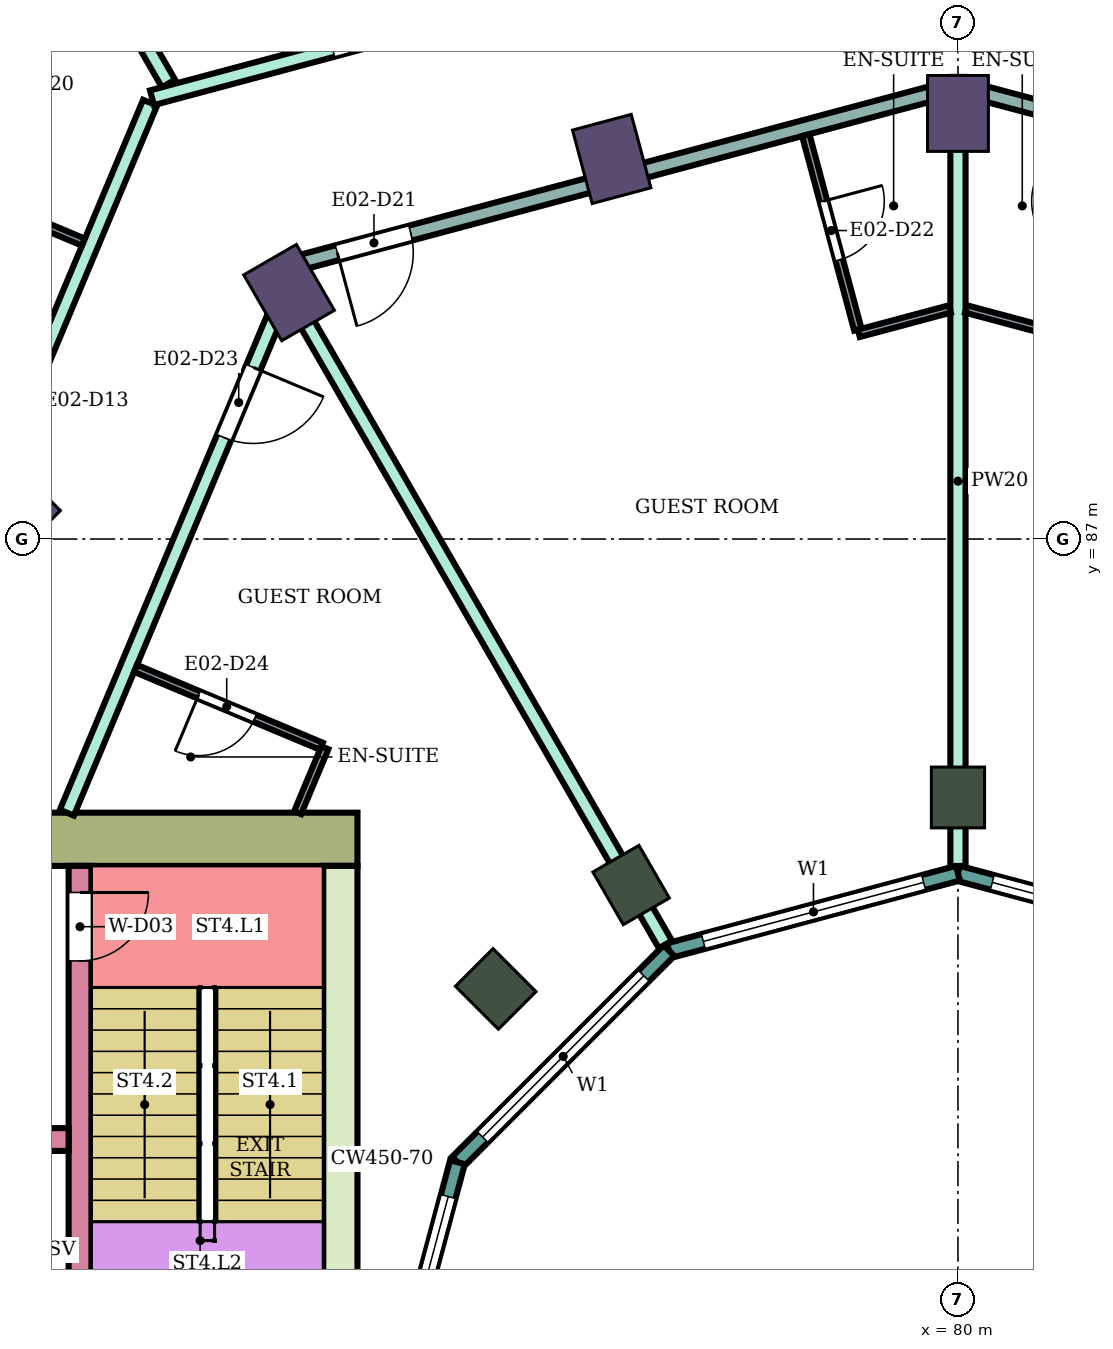
"""IFC4 building model, lengths in metres.
Left out: names, types, materials, properties, quantities, classifications, styles, units other than length and angle.
Written with IfcOpenShell. Run it as: python <this file> out.ifc"""

import sys

from ifc_helpers import new_model, si_unit, direction, frame, frame_2d, origin, origin_2d, place, context, subcontext, project, spatial, rectangle, extrude, element, fill, save


model = new_model("IFC4")
c1 = context("Model", 3, precision=1e-05, world=origin(), true_north=direction((0.0, 1.0)))
c2 = subcontext(c1, "Body", "Model", "MODEL_VIEW")
j1 = project(units=[si_unit("LENGTHUNIT", "METRE"), si_unit("PLANEANGLEUNIT", "RADIAN")], contexts=[c1])
p1 = place(None, origin())
s1 = spatial("IfcSite", under=j1, at=p1, CompositionType="ELEMENT")
p2 = place(p1, origin())
s2 = spatial("IfcBuilding", under=s1, at=p2, CompositionType="ELEMENT")
p3 = place(p2, frame((0.0, 0.0, 134.1)))
s3 = spatial("IfcBuildingStorey", under=s2, at=p3, CompositionType="ELEMENT", Elevation=134.1)
for number, where, z_axis, x_axis in (
    (1, (80.0, 92.6, 0.0), (0.0, 0.0, 1.0), (0.0, 1.0, 0.0)),
    (2, (75.445, 92.0, 0.0), (0.0, 0.0, 1.0), (-0.259, 0.966, 0.0)),
    (3, (71.2, 90.242, 0.0), (0.0, 0.0, 1.0), (-0.5, 0.866, 0.0)),
    (4, (67.555, 87.445, 0.0), (0.0, 0.0, 1.0), (-0.707, 0.707, 0.0)),
):
    element("IfcColumn", number, at=place(p3, frame(where, z_axis=z_axis, x_axis=x_axis)), inside=s3, PredefinedType="COLUMN", context=c2, shape_type="SweptSolid", body=[
        extrude(rectangle(XDim=1.0, YDim=0.8, at=origin_2d()), origin(), (0.0, 0.0, 1.0), 3.9),
    ])
for number, where, z_axis, x_axis in (
    (5, (80.0, 83.6, 0.0), (0.0, 0.0, 1.0), (0.0, 1.0, 0.0)),
    (6, (75.7, 82.448, 0.0), (0.0, 0.0, 1.0), (-0.5, 0.866, 0.0)),
    (7, (73.919, 81.081, 0.0), (0.0, 0.0, 1.0), (-0.707, 0.707, 0.0)),
):
    element("IfcColumn", number, at=place(p3, frame(where, z_axis=z_axis, x_axis=x_axis)), inside=s3, PredefinedType="COLUMN", context=c2, shape_type="SweptSolid", body=[
        extrude(rectangle(XDim=0.8, YDim=0.7, at=origin_2d()), origin(), (0.0, 0.0, 1.0), 3.9),
    ])
p4 = place(p3, frame((72.1, 83.05, 0.0), z_axis=(0.0, 0.0, 1.0), x_axis=(-1.0, 0.0, 0.0)))
e8 = element("IfcWall", 8, at=p4, inside=s3, PredefinedType="SHEAR", context=c2, shape_type="SweptSolid", body=[
    extrude(rectangle(XDim=14.8, YDim=0.7, at=frame_2d((7.4, 0.0))), origin(), (0.0, 0.0, 1.0), 3.58),
])
p5 = place(p4, frame((4.2, 0.0, 0.0)))
e9 = element("IfcOpeningElement", 9, at=p5, cuts=e8, PredefinedType="OPENING", context=c2, shape_type="SweptSolid", body=[
    extrude(rectangle(XDim=2.4, YDim=2.4, at=frame_2d((1.2, 1.2))), frame((0.0, 0.36, 0.0), z_axis=(0.0, -1.0, 0.0), x_axis=(1.0, 0.0, 0.0)), (0.0, 0.0, 1.0), 0.72),
])
p6 = place(p3, frame((71.875, 82.7, 0.0), z_axis=(0.0, 0.0, 1.0), x_axis=(0.0, -1.0, 0.0)))
e10 = element("IfcWall", 10, at=p6, inside=s3, PredefinedType="SHEAR", context=c2, shape_type="SweptSolid", body=[
    extrude(rectangle(XDim=7.7, YDim=0.45, at=frame_2d((3.85, 0.0))), origin(), (0.0, 0.0, 1.0), 3.58),
])
p7 = place(p3, frame((68.45, 82.7, 0.0), z_axis=(0.0, 0.0, 1.0), x_axis=(0.0, -1.0, 0.0)))
e11 = element("IfcWall", 11, at=p7, inside=s3, PredefinedType="SHEAR", context=c2, shape_type="SweptSolid", body=[
    extrude(rectangle(XDim=7.7, YDim=0.3, at=frame_2d((3.85, 0.0))), origin(), (0.0, 0.0, 1.0), 3.58),
])
p8 = place(p7, frame((0.35, 0.0, 0.0)))
e12 = element("IfcOpeningElement", 12, at=p8, cuts=e11, PredefinedType="OPENING", context=c2, shape_type="SweptSolid", body=[
    extrude(rectangle(XDim=0.9, YDim=2.1, at=frame_2d((0.45, 1.05))), frame((0.0, 0.16, 0.0), z_axis=(0.0, -1.0, 0.0), x_axis=(1.0, 0.0, 0.0)), (0.0, 0.0, 1.0), 0.32),
])
p9 = place(p3, frame((68.3, 79.1, 0.0), z_axis=(0.0, 0.0, 1.0), x_axis=(-1.0, 0.0, 0.0)))
e13 = element("IfcWall", 13, at=p9, inside=s3, PredefinedType="SHEAR", context=c2, shape_type="SweptSolid", body=[
    extrude(rectangle(XDim=11.0, YDim=0.3, at=frame_2d((5.5, 0.0))), origin(), (0.0, 0.0, 1.0), 3.58),
])
p10 = place(p9, frame((0.4, 0.0, 0.0)))
e14 = element("IfcOpeningElement", 14, at=p10, cuts=e13, PredefinedType="OPENING", context=c2, shape_type="SweptSolid", body=[
    extrude(rectangle(XDim=1.4, YDim=2.1, at=frame_2d((0.7, 1.05))), frame((0.0, 0.16, 0.0), z_axis=(0.0, -1.0, 0.0), x_axis=(1.0, 0.0, 0.0)), (0.0, 0.0, 1.0), 0.32),
])
p11 = place(p9, frame((5.4, 0.0, 0.0)))
e15 = element("IfcOpeningElement", 15, at=p11, cuts=e13, PredefinedType="OPENING", context=c2, shape_type="SweptSolid", body=[
    extrude(rectangle(XDim=1.4, YDim=2.1, at=frame_2d((0.7, 1.05))), frame((0.0, 0.16, 0.0), z_axis=(0.0, -1.0, 0.0), x_axis=(1.0, 0.0, 0.0)), (0.0, 0.0, 1.0), 0.32),
])
p12 = place(p9, frame((8.1, 0.0, 0.0)))
e16 = element("IfcOpeningElement", 16, at=p12, cuts=e13, PredefinedType="OPENING", context=c2, shape_type="SweptSolid", body=[
    extrude(rectangle(XDim=1.0, YDim=2.1, at=frame_2d((0.5, 1.05))), frame((0.0, 0.16, 0.0), z_axis=(0.0, -1.0, 0.0), x_axis=(1.0, 0.0, 0.0)), (0.0, 0.0, 1.0), 0.32),
])
p13 = place(p3, frame((83.802, 81.585, 0.0), z_axis=(0.0, 0.0, 1.0), x_axis=(-0.965933654434, 0.258789828301, 0.0)))
e17 = element("IfcWall", 17, at=p13, inside=s3, PredefinedType="NOTDEFINED", context=c2, shape_type="SweptSolid", body=[
    extrude(rectangle(XDim=3.936, YDim=0.2, at=frame_2d((1.968, 0.0))), origin(), (0.0, 0.0, 1.0), 3.9),
])
p14 = place(p13, frame((0.468, 0.0, 0.9)))
e18 = element("IfcOpeningElement", 18, at=p14, cuts=e17, PredefinedType="OPENING", context=c2, shape_type="SweptSolid", body=[
    extrude(rectangle(XDim=3.0, YDim=2.3, at=frame_2d((1.5, 1.15))), frame((0.0, 0.11, 0.0), z_axis=(0.0, -1.0, 0.0), x_axis=(1.0, 0.0, 0.0)), (0.0, 0.0, 1.0), 0.22),
])
p15 = place(p3, frame((80.0, 82.604, 0.0), z_axis=(0.0, 0.0, 1.0), x_axis=(-0.965933654434, -0.258789828301, 0.0)))
e19 = element("IfcWall", 19, at=p15, inside=s3, PredefinedType="NOTDEFINED", context=c2, shape_type="SweptSolid", body=[
    extrude(rectangle(XDim=3.936, YDim=0.2, at=frame_2d((1.968, 0.0))), origin(), (0.0, 0.0, 1.0), 3.9),
])
p16 = place(p15, frame((0.468, 0.0, 0.9)))
e20 = element("IfcOpeningElement", 20, at=p16, cuts=e19, PredefinedType="OPENING", context=c2, shape_type="SweptSolid", body=[
    extrude(rectangle(XDim=3.0, YDim=2.3, at=frame_2d((1.5, 1.15))), frame((0.0, 0.11, 0.0), z_axis=(0.0, -1.0, 0.0), x_axis=(1.0, 0.0, 0.0)), (0.0, 0.0, 1.0), 0.22),
])
p17 = place(p3, frame((76.198, 81.585, 0.0), z_axis=(0.0, 0.0, 1.0), x_axis=(-0.707106781187, -0.707106781187, 0.0)))
e21 = element("IfcWall", 21, at=p17, inside=s3, PredefinedType="NOTDEFINED", context=c2, shape_type="SweptSolid", body=[
    extrude(rectangle(XDim=3.936, YDim=0.2, at=frame_2d((1.968, 0.0))), origin(), (0.0, 0.0, 1.0), 3.9),
])
p18 = place(p17, frame((0.468, 0.0, 0.9)))
e22 = element("IfcOpeningElement", 22, at=p18, cuts=e21, PredefinedType="OPENING", context=c2, shape_type="SweptSolid", body=[
    extrude(rectangle(XDim=3.0, YDim=2.3, at=frame_2d((1.5, 1.15))), frame((0.0, 0.11, 0.0), z_axis=(0.0, -1.0, 0.0), x_axis=(1.0, 0.0, 0.0)), (0.0, 0.0, 1.0), 0.22),
])
p19 = place(p3, frame((73.415, 78.802, 0.0), z_axis=(0.0, 0.0, 1.0), x_axis=(-0.258789828301, -0.965933654434, 0.0)))
e23 = element("IfcWall", 23, at=p19, inside=s3, PredefinedType="NOTDEFINED", context=c2, shape_type="SweptSolid", body=[
    extrude(rectangle(XDim=3.936, YDim=0.2, at=frame_2d((1.968, 0.0))), origin(), (0.0, 0.0, 1.0), 3.9),
])
p20 = place(p19, frame((0.468, 0.0, 0.9)))
e24 = element("IfcOpeningElement", 24, at=p20, cuts=e23, PredefinedType="OPENING", context=c2, shape_type="SweptSolid", body=[
    extrude(rectangle(XDim=3.0, YDim=2.3, at=frame_2d((1.5, 1.15))), frame((0.0, 0.11, 0.0), z_axis=(0.0, -1.0, 0.0), x_axis=(1.0, 0.0, 0.0)), (0.0, 0.0, 1.0), 0.22),
])
p21 = place(p3, frame((66.085, 84.9, 0.0), z_axis=(0.0, 0.0, 1.0), x_axis=(0.386617151403, 0.922240303956, 0.0)))
e25 = element("IfcWall", 25, at=p21, inside=s3, PredefinedType="PARTITIONING", context=c2, shape_type="SweptSolid", body=[
    extrude(rectangle(XDim=8.5, YDim=0.2, at=frame_2d((4.25, 0.0))), origin(), (0.0, 0.0, 1.0), 3.45),
])
p22 = place(p21, frame((3.748, 0.0, 0.0)))
e26 = element("IfcOpeningElement", 26, at=p22, cuts=e25, PredefinedType="OPENING", context=c2, shape_type="SweptSolid", body=[
    extrude(rectangle(XDim=1.0, YDim=2.1, at=frame_2d((0.5, 1.05))), frame((0.0, 0.11, 0.0), z_axis=(0.0, -1.0, 0.0), x_axis=(1.0, 0.0, 0.0)), (0.0, 0.0, 1.0), 0.22),
])
p23 = place(p3, frame((67.104, 97.343, 0.0), z_axis=(0.0, 0.0, 1.0), x_axis=(0.499893606134, -0.866086821598, 0.0)))
e27 = element("IfcWall", 27, at=p23, inside=s3, PredefinedType="PARTITIONING", context=c2, shape_type="SweptSolid", body=[
    extrude(rectangle(XDim=5.021, YDim=0.2, at=frame_2d((2.511, 0.0))), origin(), (0.0, 0.0, 1.0), 3.45),
])
p24 = place(p3, frame((68.277, 83.4, 0.0), z_axis=(0.0, 0.0, 1.0), x_axis=(0.386454861164, 0.922308321703, 0.0)))
e28 = element("IfcWall", 28, at=p24, inside=s3, PredefinedType="PARTITIONING", context=c2, shape_type="SweptSolid", body=[
    extrude(rectangle(XDim=7.762, YDim=0.2, at=frame_2d((3.881, 0.0))), origin(), (0.0, 0.0, 1.0), 3.45),
])
p25 = place(p24, frame((5.351, 0.0, 0.0)))
e29 = element("IfcOpeningElement", 29, at=p25, cuts=e28, PredefinedType="OPENING", context=c2, shape_type="SweptSolid", body=[
    extrude(rectangle(XDim=1.0, YDim=2.1, at=frame_2d((0.5, 1.05))), frame((0.0, 0.11, 0.0), z_axis=(0.0, -1.0, 0.0), x_axis=(1.0, 0.0, 0.0)), (0.0, 0.0, 1.0), 0.22),
])
p26 = place(p3, frame((69.397, 92.805, 0.0), z_axis=(0.0, 0.0, 1.0), x_axis=(0.965971666602, 0.258647906087, 0.0)))
e30 = element("IfcWall", 30, at=p26, inside=s3, PredefinedType="PARTITIONING", context=c2, shape_type="SweptSolid", body=[
    extrude(rectangle(XDim=10.887, YDim=0.2, at=frame_2d((5.443, 0.0))), origin(), (0.0, 0.0, 1.0), 3.45),
])
p27 = place(p26, frame((6.163, 0.0, 0.0)))
e31 = element("IfcOpeningElement", 31, at=p27, cuts=e30, PredefinedType="OPENING", context=c2, shape_type="SweptSolid", body=[
    extrude(rectangle(XDim=1.0, YDim=2.1, at=frame_2d((0.5, 1.05))), frame((0.0, 0.11, 0.0), z_axis=(0.0, -1.0, 0.0), x_axis=(1.0, 0.0, 0.0)), (0.0, 0.0, 1.0), 0.22),
])
p28 = place(p26, frame((2.461, 0.0, 0.0)))
e32 = element("IfcOpeningElement", 32, at=p28, cuts=e30, PredefinedType="OPENING", context=c2, shape_type="SweptSolid", body=[
    extrude(rectangle(XDim=1.0, YDim=2.1, at=frame_2d((0.5, 1.05))), frame((0.0, 0.11, 0.0), z_axis=(0.0, -1.0, 0.0), x_axis=(1.0, 0.0, 0.0)), (0.0, 0.0, 1.0), 0.22),
])
p29 = place(p3, frame((71.263, 90.135, 0.0), z_axis=(0.0, 0.0, 1.0), x_axis=(0.499869438034, -0.86610077065, 0.0)))
e33 = element("IfcWall", 33, at=p29, inside=s3, PredefinedType="PARTITIONING", context=c2, shape_type="SweptSolid", body=[
    extrude(rectangle(XDim=9.777, YDim=0.2, at=frame_2d((4.889, 0.0))), origin(), (0.0, 0.0, 1.0), 3.45),
])
p30 = place(p3, frame((71.303, 90.625, 0.0), z_axis=(0.0, 0.0, 1.0), x_axis=(0.965971868307, 0.258647152776, 0.0)))
e34 = element("IfcWall", 34, at=p30, inside=s3, PredefinedType="PARTITIONING", context=c2, shape_type="SweptSolid", body=[
    extrude(rectangle(XDim=8.874, YDim=0.2, at=frame_2d((4.437, 0.0))), origin(), (0.0, 0.0, 1.0), 3.08),
])
p31 = place(p30, frame((0.55, 0.0, 0.0)))
e35 = element("IfcOpeningElement", 35, at=p31, cuts=e34, PredefinedType="OPENING", context=c2, shape_type="SweptSolid", body=[
    extrude(rectangle(XDim=1.0, YDim=2.1, at=frame_2d((0.5, 1.05))), frame((0.0, 0.11, 0.0), z_axis=(0.0, -1.0, 0.0), x_axis=(1.0, 0.0, 0.0)), (0.0, 0.0, 1.0), 0.22),
])
p32 = place(p3, frame((80.0, 82.699, 0.0), z_axis=(0.0, 0.0, 1.0), x_axis=(0.0, 1.0, 0.0)))
e36 = element("IfcWall", 36, at=p32, inside=s3, PredefinedType="PARTITIONING", context=c2, shape_type="SweptSolid", body=[
    extrude(rectangle(XDim=10.125, YDim=0.2, at=frame_2d((5.062, 0.0))), origin(), (0.0, 0.0, 1.0), 3.45),
])
p33 = place(p3, frame((80.0, 92.954, 0.0), z_axis=(0.0, 0.0, 1.0), x_axis=(0.96592536278, -0.258820774936, 0.0)))
e37 = element("IfcWall", 37, at=p33, inside=s3, PredefinedType="PARTITIONING", context=c2, shape_type="SweptSolid", body=[
    extrude(rectangle(XDim=8.934, YDim=0.2, at=frame_2d((4.467, 0.0))), origin(), (0.0, 0.0, 1.0), 3.08),
])
p34 = place(p33, frame((7.454, 0.0, 0.0)))
e38 = element("IfcOpeningElement", 38, at=p34, cuts=e37, PredefinedType="OPENING", context=c2, shape_type="SweptSolid", body=[
    extrude(rectangle(XDim=1.0, YDim=2.1, at=frame_2d((0.5, 1.05))), frame((0.0, 0.11, 0.0), z_axis=(0.0, -1.0, 0.0), x_axis=(1.0, 0.0, 0.0)), (0.0, 0.0, 1.0), 0.22),
])
p35 = place(p3, frame((80.0, 95.648, 0.0), z_axis=(0.0, 0.0, 1.0), x_axis=(0.965852259202, -0.259093445292, 0.0)))
e39 = element("IfcWall", 39, at=p35, inside=s3, PredefinedType="PARTITIONING", context=c2, shape_type="SweptSolid", body=[
    extrude(rectangle(XDim=10.597, YDim=0.2, at=frame_2d((5.298, 0.0))), origin(), (0.0, 0.0, 1.0), 3.45),
])
p36 = place(p35, frame((1.0, 0.0, 0.0)))
e40 = element("IfcOpeningElement", 40, at=p36, cuts=e39, PredefinedType="OPENING", context=c2, shape_type="SweptSolid", body=[
    extrude(rectangle(XDim=1.0, YDim=2.1, at=frame_2d((0.5, 1.05))), frame((0.0, 0.11, 0.0), z_axis=(0.0, -1.0, 0.0), x_axis=(1.0, 0.0, 0.0)), (0.0, 0.0, 1.0), 0.22),
])
p37 = place(p3, frame((66.049, 91.931, 0.0), z_axis=(0.0, 0.0, 1.0), x_axis=(0.922344808264, -0.38636777126, 0.0)))
e41 = element("IfcWall", 41, at=p37, inside=s3, PredefinedType="PARTITIONING", context=c2, shape_type="SweptSolid", body=[
    extrude(rectangle(XDim=2.65, YDim=0.1, at=frame_2d((1.325, 0.0))), origin(), (0.0, 0.0, 1.0), 3.45),
])
p38 = place(p3, frame((69.181, 85.298, 0.0), z_axis=(0.0, 0.0, 1.0), x_axis=(0.922377635784, -0.38628939541, 0.0)))
e42 = element("IfcWall", 42, at=p38, inside=s3, PredefinedType="PARTITIONING", context=c2, shape_type="SweptSolid", body=[
    extrude(rectangle(XDim=2.65, YDim=0.1, at=frame_2d((1.325, 0.0))), origin(), (0.0, 0.0, 1.0), 3.45),
])
p39 = place(p38, frame((0.9, 0.0, 0.0)))
e43 = element("IfcOpeningElement", 43, at=p39, cuts=e42, PredefinedType="OPENING", context=c2, shape_type="SweptSolid", body=[
    extrude(rectangle(XDim=0.8, YDim=2.1, at=frame_2d((0.4, 1.05))), frame((0.0, 0.06, 0.0), z_axis=(0.0, -1.0, 0.0), x_axis=(1.0, 0.0, 0.0)), (0.0, 0.0, 1.0), 0.12),
])
p40 = place(p3, frame((71.313, 83.4, 0.0), z_axis=(0.0, 0.0, 1.0), x_axis=(0.386148512695, 0.922436624459, 0.0)))
e44 = element("IfcWall", 44, at=p40, inside=s3, PredefinedType="PARTITIONING", context=c2, shape_type="SweptSolid", body=[
    extrude(rectangle(XDim=0.927, YDim=0.1, at=frame_2d((0.463, 0.0))), origin(), (0.0, 0.0, 1.0), 3.45),
])
p41 = place(p3, frame((77.998, 92.314, 0.0), z_axis=(0.0, 0.0, 1.0), x_axis=(0.258608674509, -0.965982170368, 0.0)))
e45 = element("IfcWall", 45, at=p41, inside=s3, PredefinedType="PARTITIONING", context=c2, shape_type="SweptSolid", body=[
    extrude(rectangle(XDim=2.65, YDim=0.1, at=frame_2d((1.325, 0.0))), origin(), (0.0, 0.0, 1.0), 3.45),
])
p42 = place(p41, frame((0.9, 0.0, 0.0)))
e46 = element("IfcOpeningElement", 46, at=p42, cuts=e45, PredefinedType="OPENING", context=c2, shape_type="SweptSolid", body=[
    extrude(rectangle(XDim=0.8, YDim=2.1, at=frame_2d((0.4, 1.05))), frame((0.0, 0.06, 0.0), z_axis=(0.0, -1.0, 0.0), x_axis=(1.0, 0.0, 0.0)), (0.0, 0.0, 1.0), 0.12),
])
p43 = place(p3, frame((78.696, 89.706, 0.0), z_axis=(0.0, 0.0, 1.0), x_axis=(0.966002513606, 0.258532674351, 0.0)))
e47 = element("IfcWall", 47, at=p43, inside=s3, PredefinedType="PARTITIONING", context=c2, shape_type="SweptSolid", body=[
    extrude(rectangle(XDim=1.24, YDim=0.1, at=frame_2d((0.62, 0.0))), origin(), (0.0, 0.0, 1.0), 3.45),
])
p44 = place(p3, frame((80.106, 90.027, 0.0), z_axis=(0.0, 0.0, 1.0), x_axis=(0.966002973184, -0.258530957139, 0.0)))
e48 = element("IfcWall", 48, at=p44, inside=s3, PredefinedType="PARTITIONING", context=c2, shape_type="SweptSolid", body=[
    extrude(rectangle(XDim=1.19, YDim=0.1, at=frame_2d((0.595, 0.0))), origin(), (0.0, 0.0, 1.0), 3.45),
])
p45 = place(p14, origin())
e49 = element("IfcWindow", 49, at=p45, inside=s3, PartitioningType="SINGLE_PANEL", PredefinedType="WINDOW", context=c2, shape_type="SweptSolid", body=[
    extrude(rectangle(XDim=3.0, YDim=2.3, at=frame_2d((1.5, 1.15))), frame((0.0, 0.03, 0.0), z_axis=(0.0, -1.0, 0.0), x_axis=(1.0, 0.0, 0.0)), (0.0, 0.0, 1.0), 0.06),
])
fill(e18, e49)
p46 = place(p16, origin())
e50 = element("IfcWindow", 50, at=p46, inside=s3, PartitioningType="SINGLE_PANEL", PredefinedType="WINDOW", context=c2, shape_type="SweptSolid", body=[
    extrude(rectangle(XDim=3.0, YDim=2.3, at=frame_2d((1.5, 1.15))), frame((0.0, 0.03, 0.0), z_axis=(0.0, -1.0, 0.0), x_axis=(1.0, 0.0, 0.0)), (0.0, 0.0, 1.0), 0.06),
])
fill(e20, e50)
p47 = place(p18, origin())
e51 = element("IfcWindow", 51, at=p47, inside=s3, PartitioningType="SINGLE_PANEL", PredefinedType="WINDOW", context=c2, shape_type="SweptSolid", body=[
    extrude(rectangle(XDim=3.0, YDim=2.3, at=frame_2d((1.5, 1.15))), frame((0.0, 0.03, 0.0), z_axis=(0.0, -1.0, 0.0), x_axis=(1.0, 0.0, 0.0)), (0.0, 0.0, 1.0), 0.06),
])
fill(e22, e51)
p48 = place(p20, origin())
e52 = element("IfcWindow", 52, at=p48, inside=s3, PartitioningType="SINGLE_PANEL", PredefinedType="WINDOW", context=c2, shape_type="SweptSolid", body=[
    extrude(rectangle(XDim=3.0, YDim=2.3, at=frame_2d((1.5, 1.15))), frame((0.0, 0.03, 0.0), z_axis=(0.0, -1.0, 0.0), x_axis=(1.0, 0.0, 0.0)), (0.0, 0.0, 1.0), 0.06),
])
fill(e24, e52)
p49 = place(p31, frame((1.0, 0.0, 0.0), z_axis=(0.0, 0.0, 1.0), x_axis=(-1.0, 0.0, 0.0)))
e53 = element("IfcDoor", 53, at=p49, inside=s3, OperationType="SINGLE_SWING_RIGHT", PredefinedType="DOOR", context=c2, shape_type="SweptSolid", body=[
    extrude(rectangle(XDim=1.0, YDim=2.1, at=frame_2d((0.5, 1.05))), frame((0.0, 0.025, 0.0), z_axis=(0.0, -1.0, 0.0), x_axis=(1.0, 0.0, 0.0)), (0.0, 0.0, 1.0), 0.05),
])
fill(e35, e53)
p50 = place(p42, origin())
e54 = element("IfcDoor", 54, at=p50, inside=s3, OperationType="SINGLE_SWING_LEFT", PredefinedType="DOOR", context=c2, shape_type="SweptSolid", body=[
    extrude(rectangle(XDim=0.8, YDim=2.1, at=frame_2d((0.4, 1.05))), frame((0.0, 0.025, 0.0), z_axis=(0.0, -1.0, 0.0), x_axis=(1.0, 0.0, 0.0)), (0.0, 0.0, 1.0), 0.05),
])
fill(e46, e54)
p51 = place(p25, frame((1.0, 0.0, 0.0), z_axis=(0.0, 0.0, 1.0), x_axis=(-1.0, 0.0, 0.0)))
e55 = element("IfcDoor", 55, at=p51, inside=s3, OperationType="SINGLE_SWING_LEFT", PredefinedType="DOOR", context=c2, shape_type="SweptSolid", body=[
    extrude(rectangle(XDim=1.0, YDim=2.1, at=frame_2d((0.5, 1.05))), frame((0.0, 0.025, 0.0), z_axis=(0.0, -1.0, 0.0), x_axis=(1.0, 0.0, 0.0)), (0.0, 0.0, 1.0), 0.05),
])
fill(e29, e55)
p52 = place(p39, frame((0.8, 0.0, 0.0), z_axis=(0.0, 0.0, 1.0), x_axis=(-1.0, 0.0, 0.0)))
e56 = element("IfcDoor", 56, at=p52, inside=s3, OperationType="SINGLE_SWING_RIGHT", PredefinedType="DOOR", context=c2, shape_type="SweptSolid", body=[
    extrude(rectangle(XDim=0.8, YDim=2.1, at=frame_2d((0.4, 1.05))), frame((0.0, 0.025, 0.0), z_axis=(0.0, -1.0, 0.0), x_axis=(1.0, 0.0, 0.0)), (0.0, 0.0, 1.0), 0.05),
])
fill(e43, e56)
p53 = place(p8, origin())
e57 = element("IfcDoor", 57, at=p53, inside=s3, OperationType="SINGLE_SWING_LEFT", PredefinedType="DOOR", context=c2, shape_type="SweptSolid", body=[
    extrude(rectangle(XDim=0.9, YDim=2.1, at=frame_2d((0.45, 1.05))), frame((0.0, 0.025, 0.0), z_axis=(0.0, -1.0, 0.0), x_axis=(1.0, 0.0, 0.0)), (0.0, 0.0, 1.0), 0.05),
])
fill(e12, e57)
save(model, sys.argv[1])
